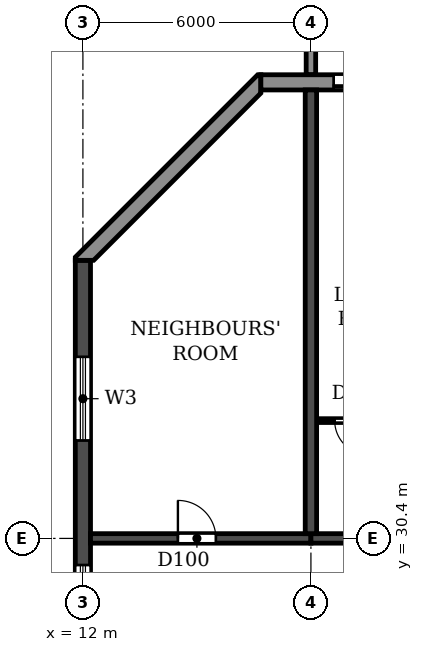
"""IFC4 building model, lengths in metres.
Left out: names, types, materials, properties, quantities, classifications, styles, units other than length and angle.
Written with IfcOpenShell. Run it as: python <this file> out.ifc"""

import sys

from ifc_helpers import new_model, si_unit, direction, frame, frame_2d, origin, place, context, subcontext, project, spatial, polyline, rectangle, outline, extrude, source, transform, mapped, element, fill, save


model = new_model("IFC4")
c1 = context("Model", 3, precision=1e-05, world=origin(), true_north=direction((0.0, 1.0)))
c2 = subcontext(c1, "Body", "Model", "MODEL_VIEW")
j1 = project(units=[si_unit("LENGTHUNIT", "METRE"), si_unit("PLANEANGLEUNIT", "RADIAN")], contexts=[c1])
p1 = place(None, origin())
s1 = spatial("IfcSite", under=j1, at=p1, CompositionType="ELEMENT")
p2 = place(p1, origin())
s2 = spatial("IfcBuilding", under=s1, at=p2, CompositionType="ELEMENT")
p3 = place(p2, frame((0.0, 0.0, 132.3)))
s3 = spatial("IfcBuildingStorey", under=s2, at=p3, CompositionType="ELEMENT", Elevation=132.3)
p4 = place(p3, frame((18.0, 30.525, 0.0), z_axis=(0.0, 0.0, 1.0), x_axis=(0.0, 1.0, 0.0)))
e1 = element("IfcWall", 1, at=p4, inside=s3, PredefinedType="SHEAR", context=c2, shape_type="SweptSolid", body=[
    extrude(rectangle(XDim=11.675, YDim=0.3, at=frame_2d((5.837, 0.0))), origin(), (0.0, 0.0, 1.0), 3.07),
])
p5 = place(p3, frame((12.0, 4.683, 0.0), z_axis=(0.0, 0.0, 1.0), x_axis=(0.0, 1.0, 0.0)))
e2 = element("IfcWall", 2, at=p5, inside=s3, PredefinedType="SHEAR", context=c2, shape_type="SweptSolid", body=[
    extrude(rectangle(XDim=33.034, YDim=0.4, at=frame_2d((16.517, 0.0))), origin(), (0.0, 0.0, 1.0), 3.07),
])
p6 = place(p5, frame((23.817, 0.0, 0.9)))
e3 = element("IfcOpeningElement", 3, at=p6, cuts=e2, PredefinedType="OPENING", context=c2, shape_type="SweptSolid", body=[
    extrude(rectangle(XDim=1.2, YDim=1.5, at=frame_2d((0.6, 0.75))), frame((0.0, 0.21, 0.0), z_axis=(0.0, -1.0, 0.0), x_axis=(1.0, 0.0, 0.0)), (0.0, 0.0, 1.0), 0.42),
])
p7 = place(p5, frame((8.017, 0.0, 0.9)))
e4 = element("IfcOpeningElement", 4, at=p7, cuts=e2, PredefinedType="OPENING", context=c2, shape_type="SweptSolid", body=[
    extrude(rectangle(XDim=1.2, YDim=1.5, at=frame_2d((0.6, 0.75))), frame((0.0, 0.21, 0.0), z_axis=(0.0, -1.0, 0.0), x_axis=(1.0, 0.0, 0.0)), (0.0, 0.0, 1.0), 0.42),
])
p8 = place(p5, frame((28.293, 0.0, 0.6)))
e5 = element("IfcOpeningElement", 5, at=p8, cuts=e2, PredefinedType="OPENING", context=c2, shape_type="SweptSolid", body=[
    extrude(rectangle(XDim=2.2, YDim=1.8, at=frame_2d((1.1, 0.9))), frame((0.0, 0.21, 0.0), z_axis=(0.0, -1.0, 0.0), x_axis=(1.0, 0.0, 0.0)), (0.0, 0.0, 1.0), 0.42),
])
p9 = place(p5, frame((2.541, 0.0, 0.6)))
e6 = element("IfcOpeningElement", 6, at=p9, cuts=e2, PredefinedType="OPENING", context=c2, shape_type="SweptSolid", body=[
    extrude(rectangle(XDim=2.2, YDim=1.8, at=frame_2d((1.1, 0.9))), frame((0.0, 0.21, 0.0), z_axis=(0.0, -1.0, 0.0), x_axis=(1.0, 0.0, 0.0)), (0.0, 0.0, 1.0), 0.42),
])
p10 = place(p3, frame((12.2, 30.4, 0.0), z_axis=(0.0, 0.0, 1.0), x_axis=(1.0, 0.0, 0.0)))
e7 = element("IfcWall", 7, at=p10, inside=s3, PredefinedType="SHEAR", context=c2, shape_type="SweptSolid", body=[
    extrude(rectangle(XDim=5.8, YDim=0.25, at=frame_2d((2.9, 0.0))), origin(), (0.0, 0.0, 1.0), 2.47),
])
p11 = place(p10, frame((2.3, 0.0, 0.0)))
e8 = element("IfcOpeningElement", 8, at=p11, cuts=e7, PredefinedType="OPENING", context=c2, shape_type="SweptSolid", body=[
    extrude(rectangle(XDim=1.0, YDim=2.1, at=frame_2d((0.5, 1.05))), frame((0.0, 0.135, 0.0), z_axis=(0.0, -1.0, 0.0), x_axis=(1.0, 0.0, 0.0)), (0.0, 0.0, 1.0), 0.27),
])
p12 = place(p3, frame((18.0, 30.4, 0.0), z_axis=(0.0, 0.0, 1.0), x_axis=(1.0, 0.0, 0.0)))
e9 = element("IfcWall", 9, at=p12, inside=s3, PredefinedType="SHEAR", context=c2, shape_type="SweptSolid", body=[
    extrude(rectangle(XDim=6.0, YDim=0.25, at=frame_2d((3.0, 0.0))), origin(), (0.0, 0.0, 1.0), 2.47),
])
p13 = place(p12, frame((2.55, 0.0, 0.0)))
e10 = element("IfcOpeningElement", 10, at=p13, cuts=e9, PredefinedType="OPENING", context=c2, shape_type="SweptSolid", body=[
    extrude(rectangle(XDim=1.0, YDim=2.1, at=frame_2d((0.5, 1.05))), frame((0.0, 0.135, 0.0), z_axis=(0.0, -1.0, 0.0), x_axis=(1.0, 0.0, 0.0)), (0.0, 0.0, 1.0), 0.27),
])
p14 = place(p3, frame((85.317, 42.4, 0.0), z_axis=(0.0, 0.0, 1.0), x_axis=(-1.0, 0.0, 0.0)))
e11 = element("IfcWall", 11, at=p14, inside=s3, PredefinedType="STANDARD", context=c2, shape_type="SweptSolid", body=[
    extrude(rectangle(XDim=68.634, YDim=0.4, at=frame_2d((34.317, 0.0))), origin(), (0.0, 0.0, 1.0), 3.07),
])
p15 = place(p14, frame((64.917, 0.0, 0.0)))
e12 = element("IfcOpeningElement", 12, at=p15, cuts=e11, PredefinedType="OPENING", context=c2, shape_type="SweptSolid", body=[
    extrude(rectangle(XDim=1.8, YDim=2.4, at=frame_2d((0.9, 1.2))), frame((0.0, 0.21, 0.0), z_axis=(0.0, -1.0, 0.0), x_axis=(1.0, 0.0, 0.0)), (0.0, 0.0, 1.0), 0.42),
])
p16 = place(p14, frame((61.717, 0.0, 0.9)))
e13 = element("IfcOpeningElement", 13, at=p16, cuts=e11, PredefinedType="OPENING", context=c2, shape_type="SweptSolid", body=[
    extrude(rectangle(XDim=2.2, YDim=1.5, at=frame_2d((1.1, 0.75))), frame((0.0, 0.21, 0.0), z_axis=(0.0, -1.0, 0.0), x_axis=(1.0, 0.0, 0.0)), (0.0, 0.0, 1.0), 0.42),
])
p17 = place(p14, frame((58.717, 0.0, 0.9)))
e14 = element("IfcOpeningElement", 14, at=p17, cuts=e11, PredefinedType="OPENING", context=c2, shape_type="SweptSolid", body=[
    extrude(rectangle(XDim=2.2, YDim=1.5, at=frame_2d((1.1, 0.75))), frame((0.0, 0.21, 0.0), z_axis=(0.0, -1.0, 0.0), x_axis=(1.0, 0.0, 0.0)), (0.0, 0.0, 1.0), 0.42),
])
p18 = place(p14, frame((55.717, 0.0, 0.9)))
e15 = element("IfcOpeningElement", 15, at=p18, cuts=e11, PredefinedType="OPENING", context=c2, shape_type="SweptSolid", body=[
    extrude(rectangle(XDim=2.2, YDim=1.5, at=frame_2d((1.1, 0.75))), frame((0.0, 0.21, 0.0), z_axis=(0.0, -1.0, 0.0), x_axis=(1.0, 0.0, 0.0)), (0.0, 0.0, 1.0), 0.42),
])
p19 = place(p14, frame((52.917, 0.0, 0.0)))
e16 = element("IfcOpeningElement", 16, at=p19, cuts=e11, PredefinedType="OPENING", context=c2, shape_type="SweptSolid", body=[
    extrude(rectangle(XDim=1.8, YDim=2.4, at=frame_2d((0.9, 1.2))), frame((0.0, 0.21, 0.0), z_axis=(0.0, -1.0, 0.0), x_axis=(1.0, 0.0, 0.0)), (0.0, 0.0, 1.0), 0.42),
])
p20 = place(p14, frame((49.717, 0.0, 0.9)))
e17 = element("IfcOpeningElement", 17, at=p20, cuts=e11, PredefinedType="OPENING", context=c2, shape_type="SweptSolid", body=[
    extrude(rectangle(XDim=2.2, YDim=1.5, at=frame_2d((1.1, 0.75))), frame((0.0, 0.21, 0.0), z_axis=(0.0, -1.0, 0.0), x_axis=(1.0, 0.0, 0.0)), (0.0, 0.0, 1.0), 0.42),
])
p21 = place(p14, frame((46.717, 0.0, 0.9)))
e18 = element("IfcOpeningElement", 18, at=p21, cuts=e11, PredefinedType="OPENING", context=c2, shape_type="SweptSolid", body=[
    extrude(rectangle(XDim=2.2, YDim=1.5, at=frame_2d((1.1, 0.75))), frame((0.0, 0.21, 0.0), z_axis=(0.0, -1.0, 0.0), x_axis=(1.0, 0.0, 0.0)), (0.0, 0.0, 1.0), 0.42),
])
p22 = place(p14, frame((43.917, 0.0, 0.0)))
e19 = element("IfcOpeningElement", 19, at=p22, cuts=e11, PredefinedType="OPENING", context=c2, shape_type="SweptSolid", body=[
    extrude(rectangle(XDim=1.8, YDim=2.4, at=frame_2d((0.9, 1.2))), frame((0.0, 0.21, 0.0), z_axis=(0.0, -1.0, 0.0), x_axis=(1.0, 0.0, 0.0)), (0.0, 0.0, 1.0), 0.42),
])
p23 = place(p14, frame((40.917, 0.0, 0.0)))
e20 = element("IfcOpeningElement", 20, at=p23, cuts=e11, PredefinedType="OPENING", context=c2, shape_type="SweptSolid", body=[
    extrude(rectangle(XDim=1.8, YDim=2.4, at=frame_2d((0.9, 1.2))), frame((0.0, 0.21, 0.0), z_axis=(0.0, -1.0, 0.0), x_axis=(1.0, 0.0, 0.0)), (0.0, 0.0, 1.0), 0.42),
])
p24 = place(p14, frame((37.717, 0.0, 0.9)))
e21 = element("IfcOpeningElement", 21, at=p24, cuts=e11, PredefinedType="OPENING", context=c2, shape_type="SweptSolid", body=[
    extrude(rectangle(XDim=2.2, YDim=1.5, at=frame_2d((1.1, 0.75))), frame((0.0, 0.21, 0.0), z_axis=(0.0, -1.0, 0.0), x_axis=(1.0, 0.0, 0.0)), (0.0, 0.0, 1.0), 0.42),
])
p25 = place(p14, frame((34.717, 0.0, 0.9)))
e22 = element("IfcOpeningElement", 22, at=p25, cuts=e11, PredefinedType="OPENING", context=c2, shape_type="SweptSolid", body=[
    extrude(rectangle(XDim=2.2, YDim=1.5, at=frame_2d((1.1, 0.75))), frame((0.0, 0.21, 0.0), z_axis=(0.0, -1.0, 0.0), x_axis=(1.0, 0.0, 0.0)), (0.0, 0.0, 1.0), 0.42),
])
p26 = place(p14, frame((31.717, 0.0, 0.9)))
e23 = element("IfcOpeningElement", 23, at=p26, cuts=e11, PredefinedType="OPENING", context=c2, shape_type="SweptSolid", body=[
    extrude(rectangle(XDim=2.2, YDim=1.5, at=frame_2d((1.1, 0.75))), frame((0.0, 0.21, 0.0), z_axis=(0.0, -1.0, 0.0), x_axis=(1.0, 0.0, 0.0)), (0.0, 0.0, 1.0), 0.42),
])
p27 = place(p14, frame((28.917, 0.0, 0.0)))
e24 = element("IfcOpeningElement", 24, at=p27, cuts=e11, PredefinedType="OPENING", context=c2, shape_type="SweptSolid", body=[
    extrude(rectangle(XDim=1.8, YDim=2.4, at=frame_2d((0.9, 1.2))), frame((0.0, 0.21, 0.0), z_axis=(0.0, -1.0, 0.0), x_axis=(1.0, 0.0, 0.0)), (0.0, 0.0, 1.0), 0.42),
])
p28 = place(p14, frame((25.717, 0.0, 0.9)))
e25 = element("IfcOpeningElement", 25, at=p28, cuts=e11, PredefinedType="OPENING", context=c2, shape_type="SweptSolid", body=[
    extrude(rectangle(XDim=2.2, YDim=1.5, at=frame_2d((1.1, 0.75))), frame((0.0, 0.21, 0.0), z_axis=(0.0, -1.0, 0.0), x_axis=(1.0, 0.0, 0.0)), (0.0, 0.0, 1.0), 0.42),
])
p29 = place(p14, frame((22.717, 0.0, 0.9)))
e26 = element("IfcOpeningElement", 26, at=p29, cuts=e11, PredefinedType="OPENING", context=c2, shape_type="SweptSolid", body=[
    extrude(rectangle(XDim=2.2, YDim=1.5, at=frame_2d((1.1, 0.75))), frame((0.0, 0.21, 0.0), z_axis=(0.0, -1.0, 0.0), x_axis=(1.0, 0.0, 0.0)), (0.0, 0.0, 1.0), 0.42),
])
p30 = place(p14, frame((19.717, 0.0, 0.9)))
e27 = element("IfcOpeningElement", 27, at=p30, cuts=e11, PredefinedType="OPENING", context=c2, shape_type="SweptSolid", body=[
    extrude(rectangle(XDim=2.2, YDim=1.5, at=frame_2d((1.1, 0.75))), frame((0.0, 0.21, 0.0), z_axis=(0.0, -1.0, 0.0), x_axis=(1.0, 0.0, 0.0)), (0.0, 0.0, 1.0), 0.42),
])
p31 = place(p14, frame((16.717, 0.0, 0.9)))
e28 = element("IfcOpeningElement", 28, at=p31, cuts=e11, PredefinedType="OPENING", context=c2, shape_type="SweptSolid", body=[
    extrude(rectangle(XDim=2.2, YDim=1.5, at=frame_2d((1.1, 0.75))), frame((0.0, 0.21, 0.0), z_axis=(0.0, -1.0, 0.0), x_axis=(1.0, 0.0, 0.0)), (0.0, 0.0, 1.0), 0.42),
])
p32 = place(p14, frame((13.917, 0.0, 0.0)))
e29 = element("IfcOpeningElement", 29, at=p32, cuts=e11, PredefinedType="OPENING", context=c2, shape_type="SweptSolid", body=[
    extrude(rectangle(XDim=1.8, YDim=2.4, at=frame_2d((0.9, 1.2))), frame((0.0, 0.21, 0.0), z_axis=(0.0, -1.0, 0.0), x_axis=(1.0, 0.0, 0.0)), (0.0, 0.0, 1.0), 0.42),
])
p33 = place(p14, frame((10.717, 0.0, 0.9)))
e30 = element("IfcOpeningElement", 30, at=p33, cuts=e11, PredefinedType="OPENING", context=c2, shape_type="SweptSolid", body=[
    extrude(rectangle(XDim=2.2, YDim=1.5, at=frame_2d((1.1, 0.75))), frame((0.0, 0.21, 0.0), z_axis=(0.0, -1.0, 0.0), x_axis=(1.0, 0.0, 0.0)), (0.0, 0.0, 1.0), 0.42),
])
p34 = place(p14, frame((7.917, 0.0, 0.0)))
e31 = element("IfcOpeningElement", 31, at=p34, cuts=e11, PredefinedType="OPENING", context=c2, shape_type="SweptSolid", body=[
    extrude(rectangle(XDim=1.8, YDim=2.4, at=frame_2d((0.9, 1.2))), frame((0.0, 0.21, 0.0), z_axis=(0.0, -1.0, 0.0), x_axis=(1.0, 0.0, 0.0)), (0.0, 0.0, 1.0), 0.42),
])
p35 = place(p14, frame((4.717, 0.0, 0.9)))
e32 = element("IfcOpeningElement", 32, at=p35, cuts=e11, PredefinedType="OPENING", context=c2, shape_type="SweptSolid", body=[
    extrude(rectangle(XDim=2.2, YDim=1.5, at=frame_2d((1.1, 0.75))), frame((0.0, 0.21, 0.0), z_axis=(0.0, -1.0, 0.0), x_axis=(1.0, 0.0, 0.0)), (0.0, 0.0, 1.0), 0.42),
])
p36 = place(p14, frame((1.917, 0.0, 0.0)))
e33 = element("IfcOpeningElement", 33, at=p36, cuts=e11, PredefinedType="OPENING", context=c2, shape_type="SweptSolid", body=[
    extrude(rectangle(XDim=1.8, YDim=2.4, at=frame_2d((0.9, 1.2))), frame((0.0, 0.21, 0.0), z_axis=(0.0, -1.0, 0.0), x_axis=(1.0, 0.0, 0.0)), (0.0, 0.0, 1.0), 0.42),
])
p37 = place(p3, origin())
e34 = element("IfcWall", 34, at=p37, inside=s3, PredefinedType="STANDARD", context=c2, shape_type="SweptSolid", body=[
    extrude(outline(polyline([(16.683, 42.6), (16.6, 42.6), (11.8, 37.8), (11.8, 37.717), (12.283, 37.717), (16.683, 42.117), (16.683, 42.6)])), origin(), (0.0, 0.0, 1.0), 3.07),
])
m1 = source(origin(), c2, "Body", "SweptSolid", [
    extrude(outline(polyline([(0.0, 0.0), (0.25, 0.0), (0.25, 3.1), (0.0, 3.1), (0.0, 0.0)])), origin(), (0.0, 0.0, 1.0), 3.1),
])
p38 = place(p3, frame((17.875, 42.6, 0.0)))
e35 = element("IfcWall", 35, at=p38, inside=s3, PredefinedType="STANDARD", context=c2, shape_type="MappedRepresentation", body=[
    mapped(m1, transform((0.0, 0.0, 0.0))),
])
p39 = place(p3, frame((18.16, 33.5, 0.0), z_axis=(0.0, 0.0, 1.0), x_axis=(1.0, 0.0, 0.0)))
e36 = element("IfcWall", 36, at=p39, inside=s3, PredefinedType="PARTITIONING", context=c2, shape_type="SweptSolid", body=[
    extrude(rectangle(XDim=2.04, YDim=0.1, at=frame_2d((1.02, 0.0))), origin(), (0.0, 0.0, 1.0), 3.07),
])
p40 = place(p39, frame((0.465, 0.0, 0.0)))
e37 = element("IfcOpeningElement", 37, at=p40, cuts=e36, PredefinedType="OPENING", context=c2, shape_type="SweptSolid", body=[
    extrude(rectangle(XDim=0.9, YDim=2.1, at=frame_2d((0.45, 1.05))), frame((0.0, 0.06, 0.0), z_axis=(0.0, -1.0, 0.0), x_axis=(1.0, 0.0, 0.0)), (0.0, 0.0, 1.0), 0.12),
])
p41 = place(p15, origin())
e38 = element("IfcDoor", 38, at=p41, inside=s3, OperationType="DOUBLE_DOOR_SLIDING", PredefinedType="DOOR", context=c2, shape_type="SweptSolid", body=[
    extrude(rectangle(XDim=1.8, YDim=2.4, at=frame_2d((0.9, 1.2))), frame((0.0, 0.025, 0.0), z_axis=(0.0, -1.0, 0.0), x_axis=(1.0, 0.0, 0.0)), (0.0, 0.0, 1.0), 0.05),
])
fill(e12, e38)
p42 = place(p6, origin())
e39 = element("IfcWindow", 39, at=p42, inside=s3, PartitioningType="SINGLE_PANEL", PredefinedType="WINDOW", context=c2, shape_type="SweptSolid", body=[
    extrude(rectangle(XDim=1.2, YDim=1.5, at=frame_2d((0.6, 0.75))), frame((0.0, 0.03, 0.0), z_axis=(0.0, -1.0, 0.0), x_axis=(1.0, 0.0, 0.0)), (0.0, 0.0, 1.0), 0.06),
])
fill(e3, e39)
p43 = place(p8, origin())
e40 = element("IfcWindow", 40, at=p43, inside=s3, PartitioningType="DOUBLE_PANEL_HORIZONTAL", PredefinedType="WINDOW", context=c2, shape_type="SweptSolid", body=[
    extrude(rectangle(XDim=2.2, YDim=1.8, at=frame_2d((1.1, 0.9))), frame((0.0, 0.03, 0.0), z_axis=(0.0, -1.0, 0.0), x_axis=(1.0, 0.0, 0.0)), (0.0, 0.0, 1.0), 0.06),
])
fill(e5, e40)
p44 = place(p11, origin())
e41 = element("IfcDoor", 41, at=p44, inside=s3, OperationType="SINGLE_SWING_LEFT", PredefinedType="DOOR", context=c2, shape_type="SweptSolid", body=[
    extrude(rectangle(XDim=1.0, YDim=2.1, at=frame_2d((0.5, 1.05))), frame((0.0, 0.025, 0.0), z_axis=(0.0, -1.0, 0.0), x_axis=(1.0, 0.0, 0.0)), (0.0, 0.0, 1.0), 0.05),
])
fill(e8, e41)
p45 = place(p40, frame((0.9, 0.0, 0.0), z_axis=(0.0, 0.0, 1.0), x_axis=(-1.0, 0.0, 0.0)))
e42 = element("IfcDoor", 42, at=p45, inside=s3, OperationType="SINGLE_SWING_LEFT", PredefinedType="DOOR", context=c2, shape_type="SweptSolid", body=[
    extrude(rectangle(XDim=0.9, YDim=2.1, at=frame_2d((0.45, 1.05))), frame((0.0, 0.025, 0.0), z_axis=(0.0, -1.0, 0.0), x_axis=(1.0, 0.0, 0.0)), (0.0, 0.0, 1.0), 0.05),
])
fill(e37, e42)
save(model, sys.argv[1])
